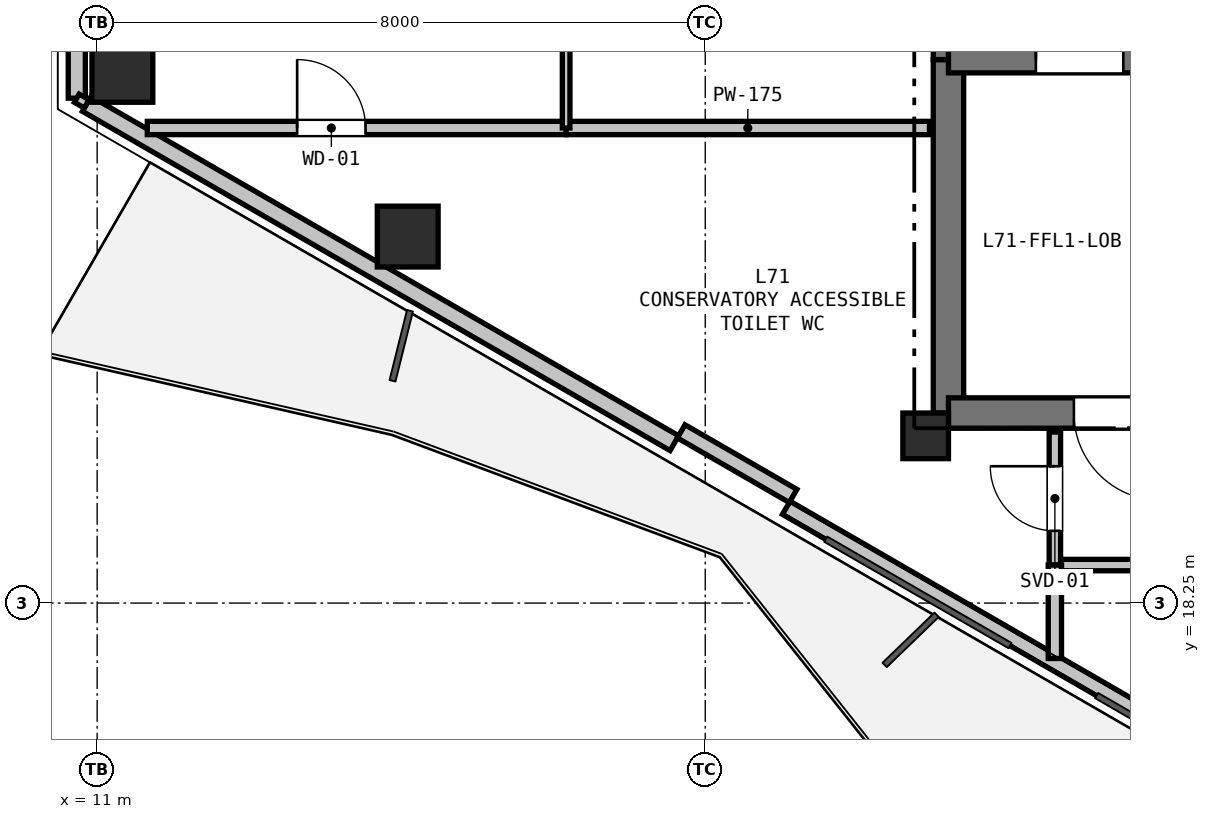
"""IFC4 building model, lengths in metres.
Left out: names, types, materials, properties, quantities, classifications, styles, units other than length and angle.
Written with IfcOpenShell. Run it as: python <this file> out.ifc"""

import sys

from ifc_helpers import new_model, si_unit, direction, frame, frame_2d, origin, origin_2d, place, context, subcontext, project, spatial, rectangle, hollow_rectangle, extrude, element, fill, save


model = new_model("IFC4")
c1 = context("Model", 3, precision=1e-05, world=origin(), true_north=direction((0.0, 1.0)))
c2 = subcontext(c1, "Body", "Model", "MODEL_VIEW")
j1 = project(units=[si_unit("LENGTHUNIT", "METRE"), si_unit("PLANEANGLEUNIT", "RADIAN")], contexts=[c1])
p1 = place(None, origin())
s1 = spatial("IfcSite", under=j1, at=p1, CompositionType="ELEMENT")
p2 = place(p1, origin())
s2 = spatial("IfcBuilding", under=s1, at=p2, CompositionType="ELEMENT")
p3 = place(p2, frame((0.0, 0.0, 254.1)))
s3 = spatial("IfcBuildingStorey", under=s2, at=p3, CompositionType="ELEMENT", Elevation=254.1)
p4 = place(p3, frame((21.9, 20.45, 0.0), z_axis=(0.0, 0.0, 1.0), x_axis=(1.0, 0.0, 0.0)))
e1 = element("IfcColumn", 1, at=p4, inside=s3, PredefinedType="COLUMN", context=c2, shape_type="SweptSolid", body=[
    extrude(rectangle(XDim=0.6, YDim=0.6, at=origin_2d()), origin(), (0.0, 0.0, 1.0), 4.5),
])
for number, where, z_axis, x_axis in (
    (2, (15.086, 23.072, 0.0), (0.0, 0.0, 1.0), (1.0, 0.0, 0.0)),
    (3, (11.332, 25.239, 0.0), (0.0, 0.0, 1.0), (1.0, 0.0, 0.0)),
):
    element("IfcColumn", number, at=place(p3, frame(where, z_axis=z_axis, x_axis=x_axis)), inside=s3, PredefinedType="COLUMN", context=c2, shape_type="SweptSolid", body=[
        extrude(hollow_rectangle(XDim=0.8, YDim=0.8, WallThickness=0.025, at=origin_2d()), origin(), (0.0, 0.0, 1.0), 4.5),
    ])
p5 = place(p3, frame((10.732, 24.892, 0.0), z_axis=(0.0, 0.0, 1.0), x_axis=(0.0, 1.0, 0.0)))
e4 = element("IfcWall", 4, at=p5, inside=s3, PredefinedType="SOLIDWALL", context=c2, shape_type="SweptSolid", body=[
    extrude(rectangle(XDim=3.715, YDim=0.225, at=frame_2d((1.858, 0.0))), origin(), (0.0, 0.0, 1.0), 3.8),
])
p6 = place(p3, frame((27.191, 15.389, 0.0), z_axis=(0.0, 0.0, 1.0), x_axis=(-0.866019557082, 0.500010126649, 0.0)))
e5 = element("IfcWall", 5, at=p6, inside=s3, PredefinedType="PARAPET", context=c2, shape_type="SweptSolid", body=[
    extrude(rectangle(XDim=8.228, YDim=0.2, at=frame_2d((4.114, 0.0))), origin(), (0.0, 0.0, 1.0), 0.2),
])
p7 = place(p3, frame((18.594, 20.354, 0.0), z_axis=(0.0, 0.0, 1.0), x_axis=(-0.866026655105, 0.499997832642, 0.0)))
e6 = element("IfcWall", 6, at=p7, inside=s3, PredefinedType="SOLIDWALL", context=c2, shape_type="SweptSolid", body=[
    extrude(rectangle(XDim=8.928, YDim=0.225, at=frame_2d((4.464, 0.0))), origin(), (0.0, 0.0, 1.0), 3.8),
])
p8 = place(p3, frame((20.156, 19.659, 0.0), z_axis=(0.0, 0.0, 1.0), x_axis=(-0.866025371046, 0.500000056704, 0.0)))
e7 = element("IfcWall", 7, at=p8, inside=s3, PredefinedType="PARAPET", context=c2, shape_type="SweptSolid", body=[
    extrude(rectangle(XDim=1.7, YDim=0.2, at=frame_2d((0.85, 0.0))), origin(), (0.0, 0.0, 1.0), 3.8),
])
p9 = place(p3, frame((22.2, 20.75, 0.0), z_axis=(0.0, 0.0, 1.0), x_axis=(0.0, 1.0, 0.0)))
e8 = element("IfcWall", 8, at=p9, inside=s3, PredefinedType="SHEAR", context=c2, shape_type="SweptSolid", body=[
    extrude(rectangle(XDim=4.65, YDim=0.4, at=frame_2d((2.325, 0.0))), origin(), (0.0, 0.0, 1.0), 4.18),
])
p10 = place(p3, frame((22.2, 25.4, 0.0), z_axis=(0.0, 0.0, 1.0), x_axis=(0.0, 1.0, 0.0)))
e9 = element("IfcWall", 9, at=p10, inside=s3, PredefinedType="SHEAR", context=c2, shape_type="SweptSolid", body=[
    extrude(rectangle(XDim=7.35, YDim=0.4, at=frame_2d((3.675, 0.0))), origin(), (0.0, 0.0, 1.0), 4.18),
])
p11 = place(p3, frame((25.65, 20.75, 0.0), z_axis=(0.0, 0.0, 1.0), x_axis=(-1.0, 0.0, 0.0)))
e10 = element("IfcWall", 10, at=p11, inside=s3, PredefinedType="SHEAR", context=c2, shape_type="SweptSolid", body=[
    extrude(rectangle(XDim=3.45, YDim=0.4, at=frame_2d((1.725, 0.0))), origin(), (0.0, 0.0, 1.0), 4.18),
])
p12 = place(p11, frame((0.65, 0.0, 0.0)))
e11 = element("IfcOpeningElement", 11, at=p12, cuts=e10, PredefinedType="OPENING", context=c2, shape_type="SweptSolid", body=[
    extrude(rectangle(XDim=1.15, YDim=2.15, at=frame_2d((0.575, 1.075))), frame((0.0, 0.21, 0.0), z_axis=(0.0, -1.0, 0.0), x_axis=(1.0, 0.0, 0.0)), (0.0, 0.0, 1.0), 0.42),
])
p13 = place(p3, frame((22.2, 25.4, 0.0), z_axis=(0.0, 0.0, 1.0), x_axis=(1.0, 0.0, 0.0)))
e12 = element("IfcWall", 12, at=p13, inside=s3, PredefinedType="SHEAR", context=c2, shape_type="SweptSolid", body=[
    extrude(rectangle(XDim=3.45, YDim=0.35, at=frame_2d((1.725, 0.0))), origin(), (0.0, 0.0, 1.0), 4.18),
])
p14 = place(p13, frame((1.15, 0.0, 0.0)))
e13 = element("IfcOpeningElement", 13, at=p14, cuts=e12, PredefinedType="OPENING", context=c2, shape_type="SweptSolid", body=[
    extrude(rectangle(XDim=1.15, YDim=2.15, at=frame_2d((0.575, 1.075))), frame((0.0, 0.185, 0.0), z_axis=(0.0, -1.0, 0.0), x_axis=(1.0, 0.0, 0.0)), (0.0, 0.0, 1.0), 0.37),
])
p15 = place(p3, frame((27.2, 18.75, 0.0), z_axis=(0.0, 0.0, 1.0), x_axis=(-1.0, 0.0, 0.0)))
e14 = element("IfcWall", 14, at=p15, inside=s3, PredefinedType="PARTITIONING", context=c2, shape_type="SweptSolid", body=[
    extrude(rectangle(XDim=3.6, YDim=0.15, at=frame_2d((1.8, 0.0))), origin(), (0.0, 0.0, 1.0), 3.628),
])
p16 = place(p15, frame((1.375, 0.0, 0.0)))
e15 = element("IfcOpeningElement", 15, at=p16, cuts=e14, PredefinedType="OPENING", context=c2, shape_type="SweptSolid", body=[
    extrude(rectangle(XDim=0.85, YDim=2.1, at=frame_2d((0.425, 1.05))), frame((0.0, 0.085, 0.0), z_axis=(0.0, -1.0, 0.0), x_axis=(1.0, 0.0, 0.0)), (0.0, 0.0, 1.0), 0.17),
])
p17 = place(p3, frame((23.6, 18.75, 0.0), z_axis=(0.0, 0.0, 1.0), x_axis=(0.0, 1.0, 0.0)))
e16 = element("IfcWall", 16, at=p17, inside=s3, PredefinedType="PARTITIONING", context=c2, shape_type="SweptSolid", body=[
    extrude(rectangle(XDim=1.75, YDim=0.15, at=frame_2d((0.875, 0.0))), origin(), (0.0, 0.0, 1.0), 3.628),
])
p18 = place(p17, frame((0.45, 0.0, 0.0)))
e17 = element("IfcOpeningElement", 17, at=p18, cuts=e16, PredefinedType="OPENING", context=c2, shape_type="SweptSolid", body=[
    extrude(rectangle(XDim=0.85, YDim=2.1, at=frame_2d((0.425, 1.05))), frame((0.0, 0.085, 0.0), z_axis=(0.0, -1.0, 0.0), x_axis=(1.0, 0.0, 0.0)), (0.0, 0.0, 1.0), 0.17),
])
p19 = place(p3, frame((23.6, 17.521, 0.0), z_axis=(0.0, 0.0, 1.0), x_axis=(0.0, 1.0, 0.0)))
e18 = element("IfcWall", 18, at=p19, inside=s3, PredefinedType="PLUMBINGWALL", context=c2, shape_type="SweptSolid", body=[
    extrude(rectangle(XDim=1.229, YDim=0.175, at=frame_2d((0.615, 0.0))), origin(), (0.0, 0.0, 1.0), 2.365),
])
p20 = place(p3, frame((11.66, 24.5, 0.0), z_axis=(0.0, 0.0, 1.0), x_axis=(1.0, 0.0, 0.0)))
e19 = element("IfcWall", 19, at=p20, inside=s3, PredefinedType="PLUMBINGWALL", context=c2, shape_type="SweptSolid", body=[
    extrude(rectangle(XDim=5.51, YDim=0.175, at=frame_2d((2.755, 0.0))), origin(), (0.0, 0.0, 1.0), 3.628),
])
p21 = place(p20, frame((1.971, 0.0, 0.0)))
e20 = element("IfcOpeningElement", 20, at=p21, cuts=e19, PredefinedType="OPENING", context=c2, shape_type="SweptSolid", body=[
    extrude(rectangle(XDim=0.9, YDim=2.1, at=frame_2d((0.45, 1.05))), frame((0.0, 0.097, 0.0), z_axis=(0.0, -1.0, 0.0), x_axis=(1.0, 0.0, 0.0)), (0.0, 0.0, 1.0), 0.195),
])
p22 = place(p3, frame((17.17, 24.5, 0.0), z_axis=(0.0, 0.0, 1.0), x_axis=(1.0, 0.0, 0.0)))
e21 = element("IfcWall", 21, at=p22, inside=s3, PredefinedType="PLUMBINGWALL", context=c2, shape_type="SweptSolid", body=[
    extrude(rectangle(XDim=4.78, YDim=0.175, at=frame_2d((2.39, 0.0))), origin(), (0.0, 0.0, 1.0), 3.705),
])
p23 = place(p3, frame((17.17, 32.167, 0.0), z_axis=(0.0, 0.0, 1.0), x_axis=(0.0, -1.0, 0.0)))
e22 = element("IfcWall", 22, at=p23, inside=s3, PredefinedType="PARTITIONING", context=c2, shape_type="SweptSolid", body=[
    extrude(rectangle(XDim=7.667, YDim=0.1, at=frame_2d((3.833, 0.0))), origin(), (0.0, 0.0, 1.0), 2.365),
])
p24 = place(p3, frame((10.862, 24.817, 0.0), z_axis=(0.0, 0.0, 1.0), x_axis=(-0.866131372301, 0.499816412211, 0.0)))
e23 = element("IfcWall", 23, at=p24, inside=s3, PredefinedType="PARTITIONING", context=c2, shape_type="SweptSolid", body=[
    extrude(rectangle(XDim=0.15, YDim=0.125, at=frame_2d((0.075, 0.0))), origin(), (0.0, 0.0, 1.0), 4.18),
])
p25 = place(p14, origin())
e24 = element("IfcDoor", 24, at=p25, inside=s3, OperationType="SINGLE_SWING_LEFT", PredefinedType="DOOR", context=c2, shape_type="SweptSolid", body=[
    extrude(rectangle(XDim=1.15, YDim=2.15, at=frame_2d((0.575, 1.075))), frame((0.0, 0.025, 0.0), z_axis=(0.0, -1.0, 0.0), x_axis=(1.0, 0.0, 0.0)), (0.0, 0.0, 1.0), 0.05),
])
fill(e13, e24)
p26 = place(p12, origin())
e25 = element("IfcDoor", 25, at=p26, inside=s3, OperationType="SINGLE_SWING_LEFT", PredefinedType="DOOR", context=c2, shape_type="SweptSolid", body=[
    extrude(rectangle(XDim=1.15, YDim=2.15, at=frame_2d((0.575, 1.075))), frame((0.0, 0.025, 0.0), z_axis=(0.0, -1.0, 0.0), x_axis=(1.0, 0.0, 0.0)), (0.0, 0.0, 1.0), 0.05),
])
fill(e11, e25)
p27 = place(p18, origin())
e26 = element("IfcDoor", 26, at=p27, inside=s3, OperationType="SINGLE_SWING_RIGHT", PredefinedType="DOOR", context=c2, shape_type="SweptSolid", body=[
    extrude(rectangle(XDim=0.85, YDim=2.1, at=frame_2d((0.425, 1.05))), frame((0.0, 0.025, 0.0), z_axis=(0.0, -1.0, 0.0), x_axis=(1.0, 0.0, 0.0)), (0.0, 0.0, 1.0), 0.05),
])
fill(e17, e26)
p28 = place(p21, origin())
e27 = element("IfcDoor", 27, at=p28, inside=s3, OperationType="SINGLE_SWING_LEFT", PredefinedType="DOOR", context=c2, shape_type="SweptSolid", body=[
    extrude(rectangle(XDim=0.9, YDim=2.1, at=frame_2d((0.45, 1.05))), frame((0.0, 0.025, 0.0), z_axis=(0.0, -1.0, 0.0), x_axis=(1.0, 0.0, 0.0)), (0.0, 0.0, 1.0), 0.05),
])
fill(e20, e27)
save(model, sys.argv[1])
